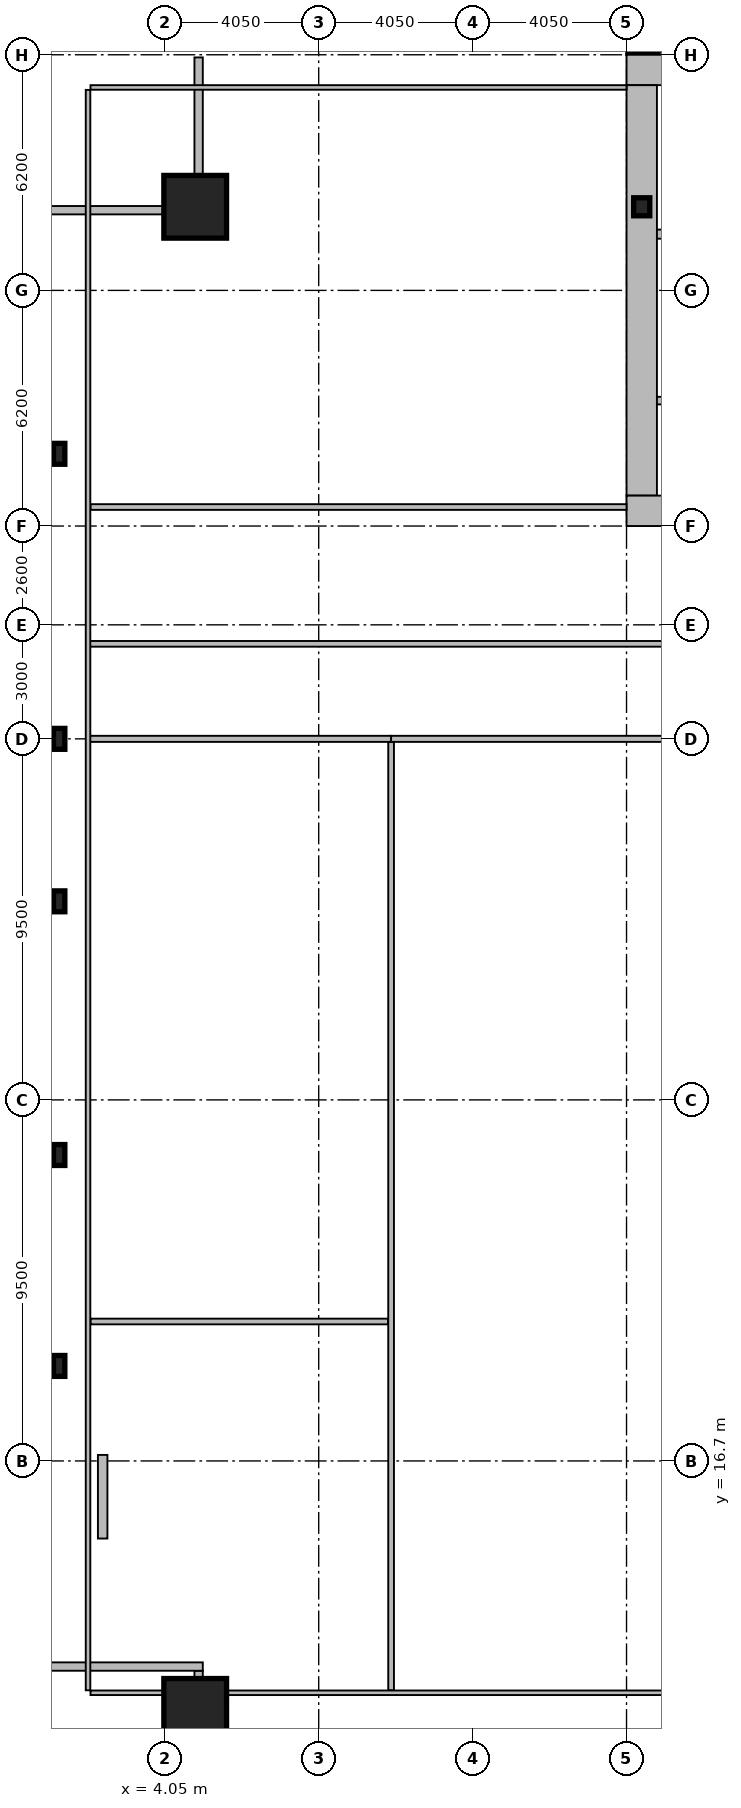
"""IFC4 building model, lengths in metres.
Left out: names, types, materials, properties, quantities, classifications, styles, units other than length and angle.
Written with IfcOpenShell. Run it as: python <this file> out.ifc"""

import sys

from ifc_helpers import new_model, si_unit, direction, frame, frame_2d, origin, origin_2d, place, context, subcontext, project, spatial, rectangle, hollow_rectangle, i_section, extrude, element, fill, save


model = new_model("IFC4")
c1 = context("Model", 3, precision=1e-05, world=origin(), true_north=direction((0.0, 1.0)))
c2 = subcontext(c1, "Body", "Model", "MODEL_VIEW")
j1 = project(units=[si_unit("LENGTHUNIT", "METRE"), si_unit("PLANEANGLEUNIT", "RADIAN")], contexts=[c1])
p1 = place(None, origin())
s1 = spatial("IfcSite", under=j1, at=p1, CompositionType="ELEMENT")
p2 = place(p1, origin())
s2 = spatial("IfcBuilding", under=s1, at=p2, CompositionType="ELEMENT")
p3 = place(p2, frame((0.0, 0.0, 25.8)))
s3 = spatial("IfcBuildingStorey", under=s2, at=p3, CompositionType="ELEMENT", Elevation=25.8)
p4 = place(p3, frame((16.2, 53.3, 0.0), z_axis=(0.0, 0.0, 1.0), x_axis=(1.0, 0.0, 0.0)))
e1 = element("IfcWall", 1, at=p4, inside=s3, PredefinedType="SHEAR", context=c2, shape_type="SweptSolid", body=[
    extrude(rectangle(XDim=40.5, YDim=0.8, at=frame_2d((20.25, 0.0))), origin(), (0.0, 0.0, 1.0), 3.82),
])
p5 = place(p3, frame((16.6, 42.1, 0.0), z_axis=(0.0, 0.0, 1.0), x_axis=(0.0, 1.0, 0.0)))
e2 = element("IfcWall", 2, at=p5, inside=s3, PredefinedType="SHEAR", context=c2, shape_type="SweptSolid", body=[
    extrude(rectangle(XDim=10.8, YDim=0.8, at=frame_2d((5.4, 0.0))), origin(), (0.0, 0.0, 1.0), 3.82),
])
p6 = place(p3, frame((18.65, 41.7, 0.0), z_axis=(0.0, 0.0, 1.0), x_axis=(-1.0, 0.0, 0.0)))
e3 = element("IfcWall", 3, at=p6, inside=s3, PredefinedType="SHEAR", context=c2, shape_type="SweptSolid", body=[
    extrude(rectangle(XDim=2.45, YDim=0.8, at=frame_2d((1.225, 0.0))), origin(), (0.0, 0.0, 1.0), 3.82),
])
p7 = place(p3, frame((17.0, 48.98, 0.0), z_axis=(0.0, 0.0, 1.0), x_axis=(1.0, 0.0, 0.0)))
e4 = element("IfcWall", 4, at=p7, inside=s3, PredefinedType="SHEAR", context=c2, shape_type="SweptSolid", body=[
    extrude(rectangle(XDim=7.22, YDim=0.24, at=frame_2d((3.61, 0.0))), origin(), (0.0, 0.0, 1.0), 3.82),
])
p8 = place(p7, frame((0.22, 0.0, 0.0)))
e5 = element("IfcOpeningElement", 5, at=p8, cuts=e4, PredefinedType="OPENING", context=c2, shape_type="SweptSolid", body=[
    extrude(rectangle(XDim=1.05, YDim=2.15, at=frame_2d((0.525, 1.075))), frame((0.0, 0.13, 0.0), z_axis=(0.0, -1.0, 0.0), x_axis=(1.0, 0.0, 0.0)), (0.0, 0.0, 1.0), 0.26),
])
for number, where, z_axis, x_axis in (
    (6, (4.85, 10.15, 0.0), (0.0, 0.0, 1.0), (1.0, 0.0, 0.0)),
    (7, (4.85, 49.7, 0.0), (0.0, 0.0, 1.0), (1.0, 0.0, 0.0)),
):
    element("IfcColumn", number, at=place(p3, frame(where, z_axis=z_axis, x_axis=x_axis)), inside=s3, PredefinedType="COLUMN", context=c2, shape_type="SweptSolid", body=[
        extrude(hollow_rectangle(XDim=1.65, YDim=1.65, WallThickness=0.075, at=origin_2d()), origin(), (0.0, 0.0, 1.0), 4.0),
    ])
for number, where, z_axis, x_axis in (
    (8, (1.27, 19.2, 0.0), (0.0, 0.0, 1.0), (1.0, 0.0, 0.0)),
    (9, (1.27, 24.75, 0.0), (0.0, 0.0, 1.0), (1.0, 0.0, 0.0)),
    (10, (1.27, 31.425, 0.0), (0.0, 0.0, 1.0), (1.0, 0.0, 0.0)),
    (11, (1.27, 35.7, 0.0), (0.0, 0.0, 1.0), (1.0, 0.0, 0.0)),
    (12, (1.27, 43.2, 0.0), (0.0, 0.0, 1.0), (1.0, 0.0, 0.0)),
):
    element("IfcColumn", number, at=place(p3, frame(where, z_axis=z_axis, x_axis=x_axis)), inside=s3, PredefinedType="COLUMN", context=c2, shape_type="SweptSolid", body=[
        extrude(i_section(OverallWidth=0.3, OverallDepth=0.55, WebThickness=0.015, FlangeThickness=0.029, at=origin_2d()), origin(), (0.0, 0.0, 1.0), 4.0),
    ])
p9 = place(p3, frame((16.6, 49.7, 0.0), z_axis=(0.0, 0.0, 1.0), x_axis=(1.0, 0.0, 0.0)))
e13 = element("IfcColumn", 13, at=p9, inside=s3, PredefinedType="COLUMN", context=c2, shape_type="SweptSolid", body=[
    extrude(i_section(OverallWidth=0.424, OverallDepth=0.474, WebThickness=0.048, FlangeThickness=0.077, at=origin_2d()), origin(), (0.0, 0.0, 1.0), 4.0),
])
p10 = place(p3, frame((4.94, 7.27, 0.0), z_axis=(0.0, 0.0, 1.0), x_axis=(0.0, 1.0, 0.0)))
e14 = element("IfcWall", 14, at=p10, inside=s3, PredefinedType="SOLIDWALL", context=c2, shape_type="SweptSolid", body=[
    extrude(rectangle(XDim=3.91, YDim=0.22, at=frame_2d((1.955, 0.0))), origin(), (0.0, 0.0, 1.0), 3.16),
])
for number, where, z_axis, x_axis in (
    (15, (5.05, 11.29, 0.0), (0.0, 0.0, 1.0), (-1.0, 0.0, 0.0)),
    (16, (0.83, 49.61, 0.0), (0.0, 0.0, 1.0), (1.0, 0.0, 0.0)),
):
    element("IfcWall", number, at=place(p3, frame(where, z_axis=z_axis, x_axis=x_axis)), inside=s3, PredefinedType="SOLIDWALL", context=c2, shape_type="SweptSolid", body=[
        extrude(rectangle(XDim=4.22, YDim=0.22, at=frame_2d((2.11, 0.0))), origin(), (0.0, 0.0, 1.0), 3.16),
    ])
p11 = place(p3, frame((4.94, 49.72, 0.0), z_axis=(0.0, 0.0, 1.0), x_axis=(0.0, 1.0, 0.0)))
e17 = element("IfcWall", 17, at=p11, inside=s3, PredefinedType="SOLIDWALL", context=c2, shape_type="SweptSolid", body=[
    extrude(rectangle(XDim=3.91, YDim=0.22, at=frame_2d((1.955, 0.0))), origin(), (0.0, 0.0, 1.0), 3.16),
])
p12 = place(p3, frame((2.415, 14.658, 0.0), z_axis=(0.0, 0.0, 1.0), x_axis=(0.0, 1.0, 0.0)))
e18 = element("IfcWall", 18, at=p12, inside=s3, PredefinedType="PARAPET", context=c2, shape_type="SweptSolid", body=[
    extrude(rectangle(XDim=2.2, YDim=0.25, at=frame_2d((1.1, 0.0))), origin(), (0.0, 0.0, 1.0), 0.88),
])
p13 = place(p12, frame((0.4, 0.0, 0.16)))
e19 = element("IfcOpeningElement", 19, at=p13, cuts=e18, PredefinedType="OPENING", context=c2, shape_type="SweptSolid", body=[
    extrude(rectangle(XDim=1.4, YDim=0.5, at=frame_2d((0.7, 0.25))), frame((0.0, 0.135, 0.0), z_axis=(0.0, -1.0, 0.0), x_axis=(1.0, 0.0, 0.0)), (0.0, 0.0, 1.0), 0.27),
])
p14 = place(p3, frame((17.0, 44.6, 0.0), z_axis=(0.0, 0.0, 1.0), x_axis=(1.0, 0.0, 0.0)))
e20 = element("IfcWall", 20, at=p14, inside=s3, PredefinedType="PARTITIONING", context=c2, shape_type="SweptSolid", body=[
    extrude(rectangle(XDim=4.0, YDim=0.2, at=frame_2d((2.0, 0.0))), origin(), (0.0, 0.0, 1.0), 3.82),
])
p15 = place(p14, frame((1.25, 0.0, 0.0)))
e21 = element("IfcOpeningElement", 21, at=p15, cuts=e20, PredefinedType="OPENING", context=c2, shape_type="SweptSolid", body=[
    extrude(rectangle(XDim=1.05, YDim=2.15, at=frame_2d((0.525, 1.075))), frame((0.0, 0.11, 0.0), z_axis=(0.0, -1.0, 0.0), x_axis=(1.0, 0.0, 0.0)), (0.0, 0.0, 1.0), 0.22),
])
p16 = place(p3, frame((2.03, 38.2, 0.0), z_axis=(0.0, 0.0, 1.0), x_axis=(1.0, 0.0, 0.0)))
e22 = element("IfcWall", 22, at=p16, inside=s3, PredefinedType="PARTITIONING", context=c2, shape_type="SweptSolid", body=[
    extrude(rectangle(XDim=16.52, YDim=0.15, at=frame_2d((8.26, 0.0))), origin(), (0.0, 0.0, 1.0), 3.01),
])
p17 = place(p16, frame((12.32, 0.0, 0.0)))
e23 = element("IfcOpeningElement", 23, at=p17, cuts=e22, PredefinedType="OPENING", context=c2, shape_type="SweptSolid", body=[
    extrude(rectangle(XDim=0.95, YDim=2.05, at=frame_2d((0.475, 1.025))), frame((0.0, 0.085, 0.0), z_axis=(0.0, -1.0, 0.0), x_axis=(1.0, 0.0, 0.0)), (0.0, 0.0, 1.0), 0.17),
])
p18 = place(p3, frame((2.095, 41.8, 0.0), z_axis=(0.0, 0.0, 1.0), x_axis=(1.0, 0.0, 0.0)))
e24 = element("IfcWall", 24, at=p18, inside=s3, PredefinedType="PARTITIONING", context=c2, shape_type="SweptSolid", body=[
    extrude(rectangle(XDim=14.105, YDim=0.15, at=frame_2d((7.052, 0.0))), origin(), (0.0, 0.0, 1.0), 3.82),
])
p19 = place(p18, frame((12.32, 0.0, 0.0)))
e25 = element("IfcOpeningElement", 25, at=p19, cuts=e24, PredefinedType="OPENING", context=c2, shape_type="SweptSolid", body=[
    extrude(rectangle(XDim=0.9, YDim=2.05, at=frame_2d((0.45, 1.025))), frame((0.0, 0.085, 0.0), z_axis=(0.0, -1.0, 0.0), x_axis=(1.0, 0.0, 0.0)), (0.0, 0.0, 1.0), 0.17),
])
p20 = place(p3, frame((2.03, 35.7, 0.0), z_axis=(0.0, 0.0, 1.0), x_axis=(1.0, 0.0, 0.0)))
e26 = element("IfcWall", 26, at=p20, inside=s3, PredefinedType="PARTITIONING", context=c2, shape_type="SweptSolid", body=[
    extrude(rectangle(XDim=7.975, YDim=0.16, at=frame_2d((3.987, 0.0))), origin(), (0.0, 0.0, 1.0), 3.01),
])
p21 = place(p20, frame((3.35, 0.0, 0.0)))
e27 = element("IfcOpeningElement", 27, at=p21, cuts=e26, PredefinedType="OPENING", context=c2, shape_type="SweptSolid", body=[
    extrude(rectangle(XDim=1.0, YDim=2.05, at=frame_2d((0.5, 1.025))), frame((0.0, 0.09, 0.0), z_axis=(0.0, -1.0, 0.0), x_axis=(1.0, 0.0, 0.0)), (0.0, 0.0, 1.0), 0.18),
])
p22 = place(p3, frame((2.095, 20.369, 0.0), z_axis=(0.0, 0.0, 1.0), x_axis=(1.0, 0.0, 0.0)))
e28 = element("IfcWall", 28, at=p22, inside=s3, PredefinedType="PARTITIONING", context=c2, shape_type="SweptSolid", body=[
    extrude(rectangle(XDim=7.83, YDim=0.15, at=frame_2d((3.915, 0.0))), origin(), (0.0, 0.0, 1.0), 3.82),
])
p23 = place(p22, frame((3.589, 0.0, 0.0)))
e29 = element("IfcOpeningElement", 29, at=p23, cuts=e28, PredefinedType="OPENING", context=c2, shape_type="SweptSolid", body=[
    extrude(rectangle(XDim=0.9, YDim=2.05, at=frame_2d((0.45, 1.025))), frame((0.0, 0.085, 0.0), z_axis=(0.0, -1.0, 0.0), x_axis=(1.0, 0.0, 0.0)), (0.0, 0.0, 1.0), 0.17),
])
p24 = place(p3, frame((10.005, 35.7, 0.0), z_axis=(0.0, 0.0, 1.0), x_axis=(1.0, 0.0, 0.0)))
e30 = element("IfcWall", 30, at=p24, inside=s3, PredefinedType="PARTITIONING", context=c2, shape_type="SweptSolid", body=[
    extrude(rectangle(XDim=13.098, YDim=0.16, at=frame_2d((6.549, 0.0))), origin(), (0.0, 0.0, 1.0), 3.01),
])
p25 = place(p24, frame((5.501, 0.0, 0.0)))
e31 = element("IfcOpeningElement", 31, at=p25, cuts=e30, PredefinedType="OPENING", context=c2, shape_type="SweptSolid", body=[
    extrude(rectangle(XDim=1.0, YDim=2.05, at=frame_2d((0.5, 1.025))), frame((0.0, 0.09, 0.0), z_axis=(0.0, -1.0, 0.0), x_axis=(1.0, 0.0, 0.0)), (0.0, 0.0, 1.0), 0.18),
])
p26 = place(p3, frame((10.005, 10.665, 0.0), z_axis=(0.0, 0.0, 1.0), x_axis=(0.0, 1.0, 0.0)))
e32 = element("IfcWall", 32, at=p26, inside=s3, PredefinedType="PARTITIONING", context=c2, shape_type="SweptSolid", body=[
    extrude(rectangle(XDim=24.95, YDim=0.15, at=frame_2d((12.475, 0.0))), origin(), (0.0, 0.0, 1.0), 3.01),
])
p27 = place(p3, frame((2.03, 10.665, 0.0), z_axis=(0.0, 0.0, 1.0), x_axis=(0.0, 1.0, 0.0)))
e33 = element("IfcWall", 33, at=p27, inside=s3, PredefinedType="PARTITIONING", context=c2, shape_type="SweptSolid", body=[
    extrude(rectangle(XDim=42.11, YDim=0.12, at=frame_2d((21.055, 0.0))), origin(), (0.0, 0.0, 1.0), 3.01),
])
p28 = place(p3, frame((2.095, 52.84, 0.0), z_axis=(0.0, 0.0, 1.0), x_axis=(1.0, 0.0, 0.0)))
e34 = element("IfcWall", 34, at=p28, inside=s3, PredefinedType="PARTITIONING", context=c2, shape_type="SweptSolid", body=[
    extrude(rectangle(XDim=14.105, YDim=0.12, at=frame_2d((7.052, 0.0))), origin(), (0.0, 0.0, 1.0), 3.82),
])
p29 = place(p3, frame((2.095, 10.6, 0.0), z_axis=(0.0, 0.0, 1.0), x_axis=(1.0, 0.0, 0.0)))
e35 = element("IfcWall", 35, at=p29, inside=s3, PredefinedType="PARTITIONING", context=c2, shape_type="SweptSolid", body=[
    extrude(rectangle(XDim=68.71, YDim=0.12, at=frame_2d((34.355, 0.0))), origin(), (0.0, 0.0, 1.0), 3.01),
])
p30 = place(p13, origin())
e36 = element("IfcWindow", 36, at=p30, inside=s3, PartitioningType="SINGLE_PANEL", PredefinedType="SKYLIGHT", context=c2, shape_type="SweptSolid", body=[
    extrude(rectangle(XDim=1.4, YDim=0.5, at=frame_2d((0.7, 0.25))), frame((0.0, 0.03, 0.0), z_axis=(0.0, -1.0, 0.0), x_axis=(1.0, 0.0, 0.0)), (0.0, 0.0, 1.0), 0.06),
])
fill(e19, e36)
p31 = place(p17, origin())
e37 = element("IfcDoor", 37, at=p31, inside=s3, OperationType="SINGLE_SWING_RIGHT", PredefinedType="DOOR", context=c2, shape_type="SweptSolid", body=[
    extrude(rectangle(XDim=0.95, YDim=2.05, at=frame_2d((0.475, 1.025))), frame((0.0, 0.025, 0.0), z_axis=(0.0, -1.0, 0.0), x_axis=(1.0, 0.0, 0.0)), (0.0, 0.0, 1.0), 0.05),
])
fill(e23, e37)
p32 = place(p19, origin())
e38 = element("IfcDoor", 38, at=p32, inside=s3, OperationType="SINGLE_SWING_RIGHT", PredefinedType="DOOR", context=c2, shape_type="SweptSolid", body=[
    extrude(rectangle(XDim=0.9, YDim=2.05, at=frame_2d((0.45, 1.025))), frame((0.0, 0.025, 0.0), z_axis=(0.0, -1.0, 0.0), x_axis=(1.0, 0.0, 0.0)), (0.0, 0.0, 1.0), 0.05),
])
fill(e25, e38)
p33 = place(p21, origin())
e39 = element("IfcDoor", 39, at=p33, inside=s3, OperationType="SINGLE_SWING_RIGHT", PredefinedType="DOOR", context=c2, shape_type="SweptSolid", body=[
    extrude(rectangle(XDim=1.0, YDim=2.05, at=frame_2d((0.5, 1.025))), frame((0.0, 0.025, 0.0), z_axis=(0.0, -1.0, 0.0), x_axis=(1.0, 0.0, 0.0)), (0.0, 0.0, 1.0), 0.05),
])
fill(e27, e39)
p34 = place(p23, origin())
e40 = element("IfcDoor", 40, at=p34, inside=s3, OperationType="SINGLE_SWING_LEFT", PredefinedType="DOOR", context=c2, shape_type="SweptSolid", body=[
    extrude(rectangle(XDim=0.9, YDim=2.05, at=frame_2d((0.45, 1.025))), frame((0.0, 0.025, 0.0), z_axis=(0.0, -1.0, 0.0), x_axis=(1.0, 0.0, 0.0)), (0.0, 0.0, 1.0), 0.05),
])
fill(e29, e40)
p35 = place(p25, origin())
e41 = element("IfcDoor", 41, at=p35, inside=s3, OperationType="SINGLE_SWING_RIGHT", PredefinedType="DOOR", context=c2, shape_type="SweptSolid", body=[
    extrude(rectangle(XDim=1.0, YDim=2.05, at=frame_2d((0.5, 1.025))), frame((0.0, 0.025, 0.0), z_axis=(0.0, -1.0, 0.0), x_axis=(1.0, 0.0, 0.0)), (0.0, 0.0, 1.0), 0.05),
])
fill(e31, e41)
save(model, sys.argv[1])
